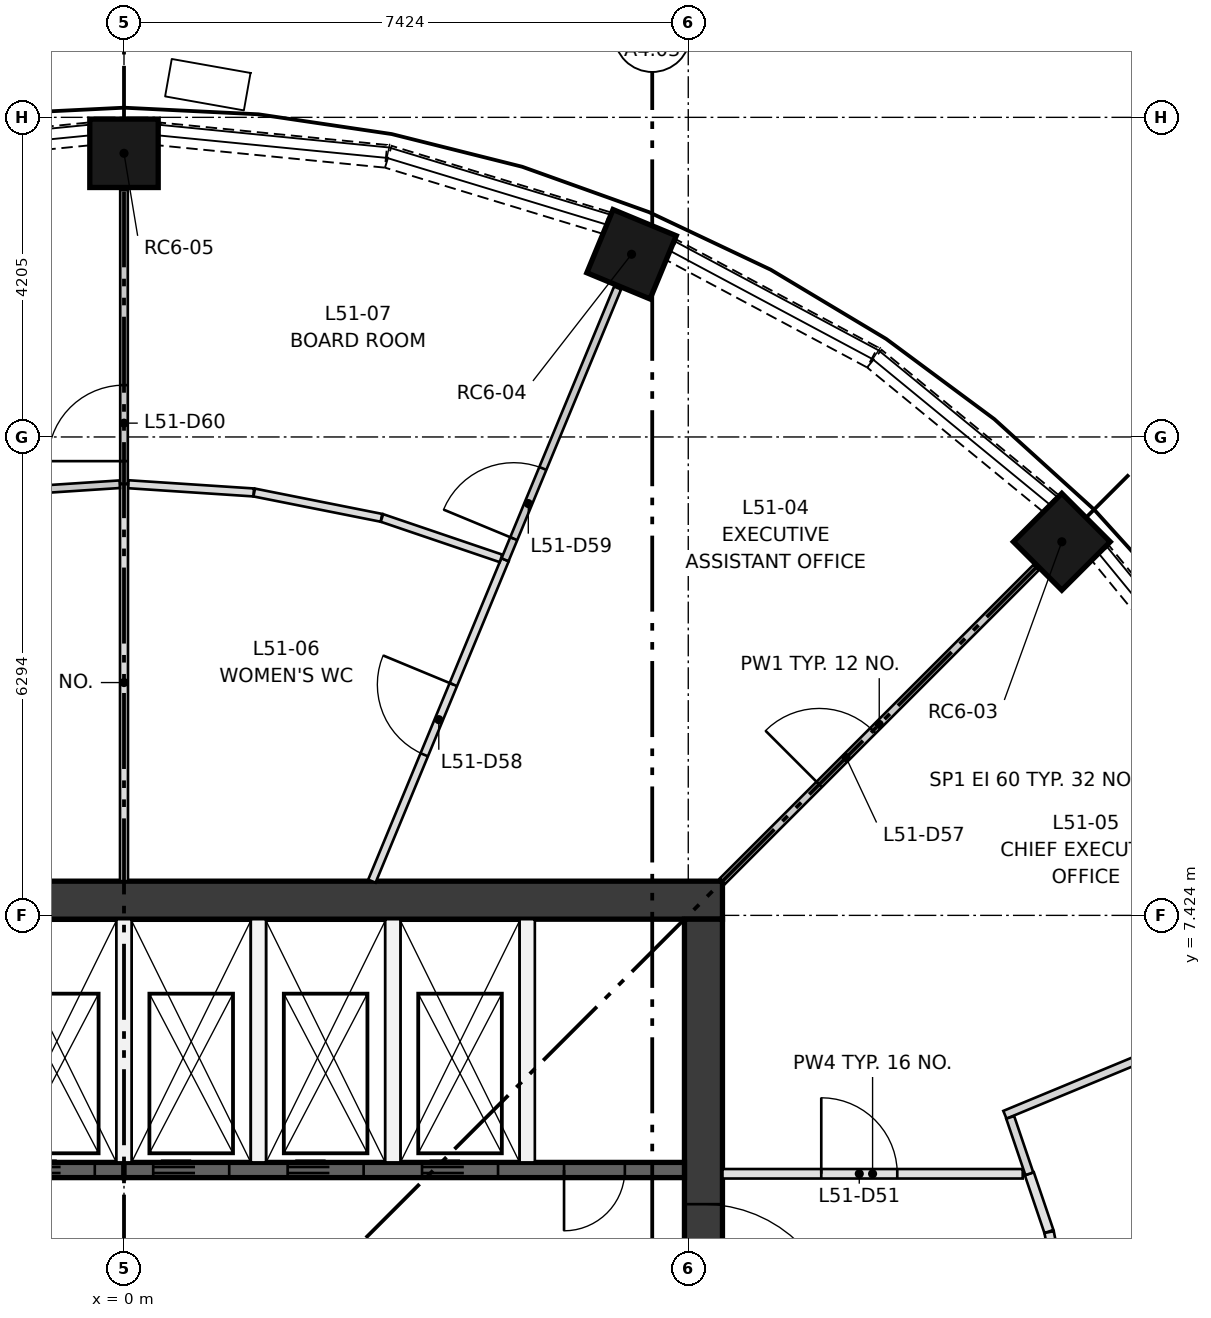
"""IFC4 building model, lengths in metres.
Left out: names, types, materials, properties, quantities, classifications, styles, units other than length and angle.
Written with IfcOpenShell. Run it as: python <this file> out.ifc"""

import sys

from ifc_helpers import new_model, si_unit, direction, frame, frame_2d, origin, origin_2d, place, context, subcontext, project, spatial, rectangle, extrude, element, fill, save


model = new_model("IFC4")
c1 = context("Model", 3, precision=1e-05, world=origin(), true_north=direction((0.0, 1.0)))
c2 = subcontext(c1, "Body", "Model", "MODEL_VIEW")
j1 = project(units=[si_unit("LENGTHUNIT", "METRE"), si_unit("PLANEANGLEUNIT", "RADIAN")], contexts=[c1])
p1 = place(None, origin())
s1 = spatial("IfcSite", under=j1, at=p1, CompositionType="ELEMENT")
p2 = place(p1, origin())
s2 = spatial("IfcBuilding", under=s1, at=p2, CompositionType="ELEMENT")
p3 = place(p2, frame((0.0, 0.0, 191.0)))
s3 = spatial("IfcBuildingStorey", under=s2, at=p3, CompositionType="ELEMENT", Elevation=191.0)
for number, where, z_axis, x_axis in (
    (1, (12.339, 12.339, 0.0), (0.0, 0.0, 1.0), (0.707, 0.707, 0.0)),
    (2, (6.678, 16.122, 0.0), (0.0, 0.0, 1.0), (0.383, 0.924, 0.0)),
    (3, (0.0, 17.45, 0.0), (0.0, 0.0, 1.0), (0.0, 1.0, 0.0)),
):
    element("IfcColumn", number, at=place(p3, frame(where, z_axis=z_axis, x_axis=x_axis)), inside=s3, PredefinedType="COLUMN", context=c2, shape_type="SweptSolid", body=[
        extrude(rectangle(XDim=0.9, YDim=0.9, at=origin_2d()), origin(), (0.0, 0.0, 1.0), 2.85),
    ])
p4 = place(p3, frame((-7.874, 7.624, 0.0), z_axis=(0.0, 0.0, 1.0), x_axis=(1.0, 0.0, 0.0)))
e4 = element("IfcWall", 4, at=p4, inside=s3, PredefinedType="SHEAR", context=c2, shape_type="SweptSolid", body=[
    extrude(rectangle(XDim=15.748, YDim=0.5, at=frame_2d((7.874, 0.0))), origin(), (0.0, 0.0, 1.0), 3.35),
])
p5 = place(p3, frame((7.624, -7.374, 0.0), z_axis=(0.0, 0.0, 1.0), x_axis=(0.0, 1.0, 0.0)))
e5 = element("IfcWall", 5, at=p5, inside=s3, PredefinedType="SHEAR", context=c2, shape_type="SweptSolid", body=[
    extrude(rectangle(XDim=14.748, YDim=0.5, at=frame_2d((7.374, 0.0))), origin(), (0.0, 0.0, 1.0), 3.35),
])
p6 = place(p5, frame((6.874, 0.0, 0.0)))
e6 = element("IfcOpeningElement", 6, at=p6, cuts=e5, PredefinedType="OPENING", context=c2, shape_type="SweptSolid", body=[
    extrude(rectangle(XDim=1.0, YDim=2.1, at=frame_2d((0.5, 1.05))), frame((0.0, 0.26, 0.0), z_axis=(0.0, -1.0, 0.0), x_axis=(1.0, 0.0, 0.0)), (0.0, 0.0, 1.0), 0.52),
])
p7 = place(p5, frame((3.75, 0.0, 0.0)))
e7 = element("IfcOpeningElement", 7, at=p7, cuts=e5, PredefinedType="OPENING", context=c2, shape_type="SweptSolid", body=[
    extrude(rectangle(XDim=1.8, YDim=2.1, at=frame_2d((0.9, 1.05))), frame((0.0, 0.26, 0.0), z_axis=(0.0, -1.0, 0.0), x_axis=(1.0, 0.0, 0.0)), (0.0, 0.0, 1.0), 0.52),
])
p8 = place(p5, frame((9.198, 0.0, 0.0)))
e8 = element("IfcOpeningElement", 8, at=p8, cuts=e5, PredefinedType="OPENING", context=c2, shape_type="SweptSolid", body=[
    extrude(rectangle(XDim=1.8, YDim=2.1, at=frame_2d((0.9, 1.05))), frame((0.0, 0.26, 0.0), z_axis=(0.0, -1.0, 0.0), x_axis=(1.0, 0.0, 0.0)), (0.0, 0.0, 1.0), 0.52),
])
p9 = place(p3, frame((-7.374, 4.074, 0.0), z_axis=(0.0, 0.0, 1.0), x_axis=(1.0, 0.0, 0.0)))
e9 = element("IfcWall", 9, at=p9, inside=s3, PredefinedType="SHEAR", context=c2, shape_type="SweptSolid", body=[
    extrude(rectangle(XDim=7.374, YDim=0.2, at=frame_2d((3.687, 0.0))), origin(), (0.0, 0.0, 1.0), 3.0),
])
p10 = place(p9, frame((0.684, 0.0, 0.0)))
e10 = element("IfcOpeningElement", 10, at=p10, cuts=e9, PredefinedType="OPENING", context=c2, shape_type="SweptSolid", body=[
    extrude(rectangle(XDim=1.0, YDim=2.1, at=frame_2d((0.5, 1.05))), frame((0.0, 0.11, 0.0), z_axis=(0.0, -1.0, 0.0), x_axis=(1.0, 0.0, 0.0)), (0.0, 0.0, 1.0), 0.22),
])
p11 = place(p9, frame((2.453, 0.0, 0.0)))
e11 = element("IfcOpeningElement", 11, at=p11, cuts=e9, PredefinedType="OPENING", context=c2, shape_type="SweptSolid", body=[
    extrude(rectangle(XDim=1.0, YDim=2.1, at=frame_2d((0.5, 1.05))), frame((0.0, 0.11, 0.0), z_axis=(0.0, -1.0, 0.0), x_axis=(1.0, 0.0, 0.0)), (0.0, 0.0, 1.0), 0.22),
])
p12 = place(p9, frame((4.221, 0.0, 0.0)))
e12 = element("IfcOpeningElement", 12, at=p12, cuts=e9, PredefinedType="OPENING", context=c2, shape_type="SweptSolid", body=[
    extrude(rectangle(XDim=1.0, YDim=2.1, at=frame_2d((0.5, 1.05))), frame((0.0, 0.11, 0.0), z_axis=(0.0, -1.0, 0.0), x_axis=(1.0, 0.0, 0.0)), (0.0, 0.0, 1.0), 0.22),
])
p13 = place(p9, frame((5.99, 0.0, 0.0)))
e13 = element("IfcOpeningElement", 13, at=p13, cuts=e9, PredefinedType="OPENING", context=c2, shape_type="SweptSolid", body=[
    extrude(rectangle(XDim=1.0, YDim=2.1, at=frame_2d((0.5, 1.05))), frame((0.0, 0.11, 0.0), z_axis=(0.0, -1.0, 0.0), x_axis=(1.0, 0.0, 0.0)), (0.0, 0.0, 1.0), 0.22),
])
p14 = place(p3, frame((0.0, 4.074, 0.0), z_axis=(0.0, 0.0, 1.0), x_axis=(1.0, 0.0, 0.0)))
e14 = element("IfcWall", 14, at=p14, inside=s3, PredefinedType="SHEAR", context=c2, shape_type="SweptSolid", body=[
    extrude(rectangle(XDim=7.374, YDim=0.2, at=frame_2d((3.687, 0.0))), origin(), (0.0, 0.0, 1.0), 3.0),
])
p15 = place(p14, frame((0.384, 0.0, 0.0)))
e15 = element("IfcOpeningElement", 15, at=p15, cuts=e14, PredefinedType="OPENING", context=c2, shape_type="SweptSolid", body=[
    extrude(rectangle(XDim=1.0, YDim=2.1, at=frame_2d((0.5, 1.05))), frame((0.0, 0.11, 0.0), z_axis=(0.0, -1.0, 0.0), x_axis=(1.0, 0.0, 0.0)), (0.0, 0.0, 1.0), 0.22),
])
p16 = place(p14, frame((2.153, 0.0, 0.0)))
e16 = element("IfcOpeningElement", 16, at=p16, cuts=e14, PredefinedType="OPENING", context=c2, shape_type="SweptSolid", body=[
    extrude(rectangle(XDim=1.0, YDim=2.1, at=frame_2d((0.5, 1.05))), frame((0.0, 0.11, 0.0), z_axis=(0.0, -1.0, 0.0), x_axis=(1.0, 0.0, 0.0)), (0.0, 0.0, 1.0), 0.22),
])
p17 = place(p14, frame((3.921, 0.0, 0.0)))
e17 = element("IfcOpeningElement", 17, at=p17, cuts=e14, PredefinedType="OPENING", context=c2, shape_type="SweptSolid", body=[
    extrude(rectangle(XDim=1.0, YDim=2.1, at=frame_2d((0.5, 1.05))), frame((0.0, 0.11, 0.0), z_axis=(0.0, -1.0, 0.0), x_axis=(1.0, 0.0, 0.0)), (0.0, 0.0, 1.0), 0.22),
])
p18 = place(p14, frame((5.79, 0.0, 0.0)))
e18 = element("IfcOpeningElement", 18, at=p18, cuts=e14, PredefinedType="OPENING", context=c2, shape_type="SweptSolid", body=[
    extrude(rectangle(XDim=0.8, YDim=2.1, at=frame_2d((0.4, 1.05))), frame((0.0, 0.11, 0.0), z_axis=(0.0, -1.0, 0.0), x_axis=(1.0, 0.0, 0.0)), (0.0, 0.0, 1.0), 0.22),
])
for number, where, z_axis, x_axis in (
    (19, (0.0, 4.174, 0.0), (0.0, 0.0, 1.0), (0.0, 1.0, 0.0)),
    (20, (1.769, 4.174, 0.0), (0.0, 0.0, 1.0), (0.0, 1.0, 0.0)),
    (21, (3.537, 4.174, 0.0), (0.0, 0.0, 1.0), (0.0, 1.0, 0.0)),
    (22, (5.305, 4.174, 0.0), (0.0, 0.0, 1.0), (0.0, 1.0, 0.0)),
):
    element("IfcWall", number, at=place(p3, frame(where, z_axis=z_axis, x_axis=x_axis)), inside=s3, PredefinedType="PARTITIONING", context=c2, shape_type="SweptSolid", body=[
        extrude(rectangle(XDim=3.2, YDim=0.2, at=frame_2d((1.6, 0.0))), origin(), (0.0, 0.0, 1.0), 3.0),
    ])
for number, where, z_axis, x_axis in (
    (23, (14.749, 9.873, 0.0), (0.0, 0.0, 1.0), (-0.634, 0.773, 0.0)),
    (24, (12.191, 12.846, 0.0), (0.0, 0.0, 1.0), (-0.773, 0.634, 0.0)),
):
    element("IfcWall", number, at=place(p3, frame(where, z_axis=z_axis, x_axis=x_axis)), inside=s3, PredefinedType="SOLIDWALL", context=c2, shape_type="SweptSolid", body=[
        extrude(rectangle(XDim=2.999, YDim=0.3, at=frame_2d((1.5, 0.0))), origin(), (0.0, 0.0, 1.0), 0.9),
    ])
p19 = place(p3, frame((9.848, 14.765, 0.0), z_axis=(0.0, 0.0, 1.0), x_axis=(-0.881827169278, 0.471572734074, 0.0)))
e25 = element("IfcWall", 25, at=p19, inside=s3, PredefinedType="SOLIDWALL", context=c2, shape_type="SweptSolid", body=[
    extrude(rectangle(XDim=2.998, YDim=0.3, at=frame_2d((1.499, 0.0))), origin(), (0.0, 0.0, 1.0), 0.9),
])
p20 = place(p3, frame((6.347, 16.533, 0.0), z_axis=(0.0, 0.0, 1.0), x_axis=(-0.95687774785, 0.290490921835, 0.0)))
e26 = element("IfcWall", 26, at=p20, inside=s3, PredefinedType="SOLIDWALL", context=c2, shape_type="SweptSolid", body=[
    extrude(rectangle(XDim=2.999, YDim=0.3, at=frame_2d((1.5, 0.0))), origin(), (0.0, 0.0, 1.0), 0.9),
])
for number, where, z_axis, x_axis in (
    (27, (3.448, 17.41, 0.0), (0.0, 0.0, 1.0), (-0.995, 0.098, 0.0)),
    (28, (-0.464, 17.705, 0.0), (0.0, 0.0, 1.0), (-0.995, -0.098, 0.0)),
):
    element("IfcWall", number, at=place(p3, frame(where, z_axis=z_axis, x_axis=x_axis)), inside=s3, PredefinedType="SOLIDWALL", context=c2, shape_type="SweptSolid", body=[
        extrude(rectangle(XDim=2.999, YDim=0.3, at=frame_2d((1.499, 0.0))), origin(), (0.0, 0.0, 1.0), 0.9),
    ])
p21 = place(p3, frame((11.912, 4.024, 0.0), z_axis=(0.0, 0.0, 1.0), x_axis=(0.321427947704, -0.946934039115, 0.0)))
e29 = element("IfcWall", 29, at=p21, inside=s3, PredefinedType="PARTITIONING", context=c2, shape_type="SweptSolid", body=[
    extrude(rectangle(XDim=0.802, YDim=0.125, at=frame_2d((0.401, 0.0))), origin(), (0.0, 0.0, 1.0), 3.0),
])
p22 = place(p3, frame((12.171, 3.257, 0.0), z_axis=(0.0, 0.0, 1.0), x_axis=(0.195171279076, -0.980769173569, 0.0)))
e30 = element("IfcWall", 30, at=p22, inside=s3, PredefinedType="PARTITIONING", context=c2, shape_type="SweptSolid", body=[
    extrude(rectangle(XDim=1.64, YDim=0.125, at=frame_2d((0.82, 0.0))), origin(), (0.0, 0.0, 1.0), 3.0),
])
p23 = place(p22, frame((0.3, 0.0, 0.0)))
e31 = element("IfcOpeningElement", 31, at=p23, cuts=e30, PredefinedType="OPENING", context=c2, shape_type="SweptSolid", body=[
    extrude(rectangle(XDim=1.0, YDim=2.1, at=frame_2d((0.5, 1.05))), frame((0.0, 0.073, 0.0), z_axis=(0.0, -1.0, 0.0), x_axis=(1.0, 0.0, 0.0)), (0.0, 0.0, 1.0), 0.145),
])
p24 = place(p3, frame((7.874, 4.024, 0.0), z_axis=(0.0, 0.0, 1.0), x_axis=(1.0, 0.0, 0.0)))
e32 = element("IfcWall", 32, at=p24, inside=s3, PredefinedType="PARTITIONING", context=c2, shape_type="SweptSolid", body=[
    extrude(rectangle(XDim=3.95, YDim=0.125, at=frame_2d((1.975, 0.0))), origin(), (0.0, 0.0, 1.0), 3.0),
])
p25 = place(p24, frame((1.3, 0.0, 0.0)))
e33 = element("IfcOpeningElement", 33, at=p25, cuts=e32, PredefinedType="OPENING", context=c2, shape_type="SweptSolid", body=[
    extrude(rectangle(XDim=1.0, YDim=2.1, at=frame_2d((0.5, 1.05))), frame((0.0, 0.073, 0.0), z_axis=(0.0, -1.0, 0.0), x_axis=(1.0, 0.0, 0.0)), (0.0, 0.0, 1.0), 0.145),
])
p26 = place(p3, frame((11.59, 4.801, 0.0), z_axis=(0.0, 0.0, 1.0), x_axis=(0.92387965154, 0.382683145003, 0.0)))
e34 = element("IfcWall", 34, at=p26, inside=s3, PredefinedType="PARTITIONING", context=c2, shape_type="SweptSolid", body=[
    extrude(rectangle(XDim=4.425, YDim=0.11, at=frame_2d((2.212, 0.0))), origin(), (0.0, 0.0, 1.0), 3.0),
])
p27 = place(p3, frame((11.912, 4.024, 0.0), z_axis=(0.0, 0.0, 1.0), x_axis=(-0.321366225339, 0.946954987954, 0.0)))
e35 = element("IfcWall", 35, at=p27, inside=s3, PredefinedType="PARTITIONING", context=c2, shape_type="SweptSolid", body=[
    extrude(rectangle(XDim=0.783, YDim=0.11, at=frame_2d((0.392, 0.0))), origin(), (0.0, 0.0, 1.0), 3.0),
])
p28 = place(p3, frame((7.874, 7.874, 0.0), z_axis=(0.0, 0.0, 1.0), x_axis=(0.707106781187, 0.707106781187, 0.0)))
e36 = element("IfcWall", 36, at=p28, inside=s3, PredefinedType="PARTITIONING", context=c2, shape_type="SweptSolid", body=[
    extrude(rectangle(XDim=5.834, YDim=0.1, at=frame_2d((2.917, 0.0))), origin(), (0.0, 0.0, 1.0), 3.0),
])
p29 = place(p28, frame((1.8, 0.0, 0.0)))
e37 = element("IfcOpeningElement", 37, at=p29, cuts=e36, PredefinedType="OPENING", context=c2, shape_type="SweptSolid", body=[
    extrude(rectangle(XDim=1.0, YDim=2.1, at=frame_2d((0.5, 1.05))), frame((0.0, 0.06, 0.0), z_axis=(0.0, -1.0, 0.0), x_axis=(1.0, 0.0, 0.0)), (0.0, 0.0, 1.0), 0.12),
])
p30 = place(p3, frame((3.261, 7.874, 0.0), z_axis=(0.0, 0.0, 1.0), x_axis=(0.382701956612, 0.923871859299, 0.0)))
e38 = element("IfcWall", 38, at=p30, inside=s3, PredefinedType="PARTITIONING", context=c2, shape_type="SweptSolid", body=[
    extrude(rectangle(XDim=4.577, YDim=0.105, at=frame_2d((2.289, 0.0))), origin(), (0.0, 0.0, 1.0), 3.0),
])
p31 = place(p30, frame((1.8, 0.0, 0.0)))
e39 = element("IfcOpeningElement", 39, at=p31, cuts=e38, PredefinedType="OPENING", context=c2, shape_type="SweptSolid", body=[
    extrude(rectangle(XDim=1.0, YDim=2.1, at=frame_2d((0.5, 1.05))), frame((0.0, 0.062, 0.0), z_axis=(0.0, -1.0, 0.0), x_axis=(1.0, 0.0, 0.0)), (0.0, 0.0, 1.0), 0.125),
])
p32 = place(p3, frame((5.013, 12.103, 0.0), z_axis=(0.0, 0.0, 1.0), x_axis=(0.382674944996, 0.923883048049, 0.0)))
e40 = element("IfcWall", 40, at=p32, inside=s3, PredefinedType="PARTITIONING", context=c2, shape_type="SweptSolid", body=[
    extrude(rectangle(XDim=3.87, YDim=0.1, at=frame_2d((1.935, 0.0))), origin(), (0.0, 0.0, 1.0), 3.0),
])
p33 = place(p32, frame((0.3, 0.0, 0.0)))
e41 = element("IfcOpeningElement", 41, at=p33, cuts=e40, PredefinedType="OPENING", context=c2, shape_type="SweptSolid", body=[
    extrude(rectangle(XDim=1.0, YDim=2.1, at=frame_2d((0.5, 1.05))), frame((0.0, 0.06, 0.0), z_axis=(0.0, -1.0, 0.0), x_axis=(1.0, 0.0, 0.0)), (0.0, 0.0, 1.0), 0.12),
])
p34 = place(p3, frame((0.056, 13.096, 0.0), z_axis=(0.0, 0.0, 1.0), x_axis=(0.997860265299, -0.06538265013, 0.0)))
e42 = element("IfcWall", 42, at=p34, inside=s3, PredefinedType="PARTITIONING", context=c2, shape_type="SweptSolid", body=[
    extrude(rectangle(XDim=1.654, YDim=0.105, at=frame_2d((0.827, 0.0))), origin(), (0.0, 0.0, 1.0), 3.0),
])
p35 = place(p3, frame((1.713, 12.987, 0.0), z_axis=(0.0, 0.0, 1.0), x_axis=(0.980778250333, -0.195125661239, 0.0)))
e43 = element("IfcWall", 43, at=p35, inside=s3, PredefinedType="PARTITIONING", context=c2, shape_type="SweptSolid", body=[
    extrude(rectangle(XDim=1.707, YDim=0.105, at=frame_2d((0.853, 0.0))), origin(), (0.0, 0.0, 1.0), 3.0),
])
p36 = place(p3, frame((3.394, 12.653, 0.0), z_axis=(0.0, 0.0, 1.0), x_axis=(0.946927367808, -0.321447600855, 0.0)))
e44 = element("IfcWall", 44, at=p36, inside=s3, PredefinedType="PARTITIONING", context=c2, shape_type="SweptSolid", body=[
    extrude(rectangle(XDim=1.654, YDim=0.105, at=frame_2d((0.827, 0.0))), origin(), (0.0, 0.0, 1.0), 3.0),
])
p37 = place(p3, frame((0.0, 7.874, 0.0), z_axis=(0.0, 0.0, 1.0), x_axis=(0.0, 1.0, 0.0)))
e45 = element("IfcWall", 45, at=p37, inside=s3, PredefinedType="PARTITIONING", context=c2, shape_type="SweptSolid", body=[
    extrude(rectangle(XDim=5.226, YDim=0.105, at=frame_2d((2.613, 0.0))), origin(), (0.0, 0.0, 1.0), 3.0),
])
p38 = place(p3, frame((0.0, 13.1, 0.0), z_axis=(0.0, 0.0, 1.0), x_axis=(0.0, 1.0, 0.0)))
e46 = element("IfcWall", 46, at=p38, inside=s3, PredefinedType="PARTITIONING", context=c2, shape_type="SweptSolid", body=[
    extrude(rectangle(XDim=3.87, YDim=0.1, at=frame_2d((1.935, 0.0))), origin(), (0.0, 0.0, 1.0), 3.0),
])
p39 = place(p38, frame((0.3, 0.0, 0.0)))
e47 = element("IfcOpeningElement", 47, at=p39, cuts=e46, PredefinedType="OPENING", context=c2, shape_type="SweptSolid", body=[
    extrude(rectangle(XDim=1.0, YDim=2.1, at=frame_2d((0.5, 1.05))), frame((0.0, 0.06, 0.0), z_axis=(0.0, -1.0, 0.0), x_axis=(1.0, 0.0, 0.0)), (0.0, 0.0, 1.0), 0.12),
])
p40 = place(p3, frame((-1.707, 12.988, 0.0), z_axis=(0.0, 0.0, 1.0), x_axis=(0.997860265299, 0.06538265013, 0.0)))
e48 = element("IfcWall", 48, at=p40, inside=s3, PredefinedType="PARTITIONING", context=c2, shape_type="SweptSolid", body=[
    extrude(rectangle(XDim=1.654, YDim=0.1, at=frame_2d((0.827, 0.0))), origin(), (0.0, 0.0, 1.0), 3.0),
])
p41 = place(p13, frame((1.0, 0.0, 0.0), z_axis=(0.0, 0.0, 1.0), x_axis=(-1.0, 0.0, 0.0)))
e49 = element("IfcDoor", 49, at=p41, inside=s3, OperationType="DOUBLE_DOOR_SLIDING", PredefinedType="DOOR", context=c2, shape_type="SweptSolid", body=[
    extrude(rectangle(XDim=1.0, YDim=2.1, at=frame_2d((0.5, 1.05))), frame((0.0, 0.025, 0.0), z_axis=(0.0, -1.0, 0.0), x_axis=(1.0, 0.0, 0.0)), (0.0, 0.0, 1.0), 0.05),
])
fill(e13, e49)
p42 = place(p15, frame((1.0, 0.0, 0.0), z_axis=(0.0, 0.0, 1.0), x_axis=(-1.0, 0.0, 0.0)))
e50 = element("IfcDoor", 50, at=p42, inside=s3, OperationType="DOUBLE_DOOR_SLIDING", PredefinedType="DOOR", context=c2, shape_type="SweptSolid", body=[
    extrude(rectangle(XDim=1.0, YDim=2.1, at=frame_2d((0.5, 1.05))), frame((0.0, 0.025, 0.0), z_axis=(0.0, -1.0, 0.0), x_axis=(1.0, 0.0, 0.0)), (0.0, 0.0, 1.0), 0.05),
])
fill(e15, e50)
p43 = place(p16, frame((1.0, 0.0, 0.0), z_axis=(0.0, 0.0, 1.0), x_axis=(-1.0, 0.0, 0.0)))
e51 = element("IfcDoor", 51, at=p43, inside=s3, OperationType="DOUBLE_DOOR_SLIDING", PredefinedType="DOOR", context=c2, shape_type="SweptSolid", body=[
    extrude(rectangle(XDim=1.0, YDim=2.1, at=frame_2d((0.5, 1.05))), frame((0.0, 0.025, 0.0), z_axis=(0.0, -1.0, 0.0), x_axis=(1.0, 0.0, 0.0)), (0.0, 0.0, 1.0), 0.05),
])
fill(e16, e51)
p44 = place(p17, frame((1.0, 0.0, 0.0), z_axis=(0.0, 0.0, 1.0), x_axis=(-1.0, 0.0, 0.0)))
e52 = element("IfcDoor", 52, at=p44, inside=s3, OperationType="DOUBLE_DOOR_SLIDING", PredefinedType="DOOR", context=c2, shape_type="SweptSolid", body=[
    extrude(rectangle(XDim=1.0, YDim=2.1, at=frame_2d((0.5, 1.05))), frame((0.0, 0.025, 0.0), z_axis=(0.0, -1.0, 0.0), x_axis=(1.0, 0.0, 0.0)), (0.0, 0.0, 1.0), 0.05),
])
fill(e17, e52)
p45 = place(p18, frame((0.8, 0.0, 0.0), z_axis=(0.0, 0.0, 1.0), x_axis=(-1.0, 0.0, 0.0)))
e53 = element("IfcDoor", 53, at=p45, inside=s3, OperationType="SINGLE_SWING_LEFT", PredefinedType="DOOR", context=c2, shape_type="SweptSolid", body=[
    extrude(rectangle(XDim=0.8, YDim=2.1, at=frame_2d((0.4, 1.05))), frame((0.0, 0.025, 0.0), z_axis=(0.0, -1.0, 0.0), x_axis=(1.0, 0.0, 0.0)), (0.0, 0.0, 1.0), 0.05),
])
fill(e18, e53)
p46 = place(p8, frame((1.8, 0.0, 0.0), z_axis=(0.0, 0.0, 1.0), x_axis=(-1.0, 0.0, 0.0)))
e54 = element("IfcDoor", 54, at=p46, inside=s3, OperationType="DOUBLE_DOOR_SINGLE_SWING", PredefinedType="DOOR", context=c2, shape_type="SweptSolid", body=[
    extrude(rectangle(XDim=1.8, YDim=2.1, at=frame_2d((0.9, 1.05))), frame((0.0, 0.025, 0.0), z_axis=(0.0, -1.0, 0.0), x_axis=(1.0, 0.0, 0.0)), (0.0, 0.0, 1.0), 0.05),
])
fill(e8, e54)
p47 = place(p25, origin())
e55 = element("IfcDoor", 55, at=p47, inside=s3, OperationType="SINGLE_SWING_LEFT", PredefinedType="DOOR", context=c2, shape_type="SweptSolid", body=[
    extrude(rectangle(XDim=1.0, YDim=2.1, at=frame_2d((0.5, 1.05))), frame((0.0, 0.025, 0.0), z_axis=(0.0, -1.0, 0.0), x_axis=(1.0, 0.0, 0.0)), (0.0, 0.0, 1.0), 0.05),
])
fill(e33, e55)
p48 = place(p29, origin())
e56 = element("IfcDoor", 56, at=p48, inside=s3, OperationType="SINGLE_SWING_LEFT", PredefinedType="DOOR", context=c2, shape_type="SweptSolid", body=[
    extrude(rectangle(XDim=1.0, YDim=2.1, at=frame_2d((0.5, 1.05))), frame((0.0, 0.025, 0.0), z_axis=(0.0, -1.0, 0.0), x_axis=(1.0, 0.0, 0.0)), (0.0, 0.0, 1.0), 0.05),
])
fill(e37, e56)
p49 = place(p31, origin())
e57 = element("IfcDoor", 57, at=p49, inside=s3, OperationType="SINGLE_SWING_RIGHT", PredefinedType="DOOR", context=c2, shape_type="SweptSolid", body=[
    extrude(rectangle(XDim=1.0, YDim=2.1, at=frame_2d((0.5, 1.05))), frame((0.0, 0.025, 0.0), z_axis=(0.0, -1.0, 0.0), x_axis=(1.0, 0.0, 0.0)), (0.0, 0.0, 1.0), 0.05),
])
fill(e39, e57)
p50 = place(p33, origin())
e58 = element("IfcDoor", 58, at=p50, inside=s3, OperationType="SINGLE_SWING_LEFT", PredefinedType="DOOR", context=c2, shape_type="SweptSolid", body=[
    extrude(rectangle(XDim=1.0, YDim=2.1, at=frame_2d((0.5, 1.05))), frame((0.0, 0.025, 0.0), z_axis=(0.0, -1.0, 0.0), x_axis=(1.0, 0.0, 0.0)), (0.0, 0.0, 1.0), 0.05),
])
fill(e41, e58)
p51 = place(p39, origin())
e59 = element("IfcDoor", 59, at=p51, inside=s3, OperationType="SINGLE_SWING_LEFT", PredefinedType="DOOR", context=c2, shape_type="SweptSolid", body=[
    extrude(rectangle(XDim=1.0, YDim=2.1, at=frame_2d((0.5, 1.05))), frame((0.0, 0.025, 0.0), z_axis=(0.0, -1.0, 0.0), x_axis=(1.0, 0.0, 0.0)), (0.0, 0.0, 1.0), 0.05),
])
fill(e47, e59)
save(model, sys.argv[1])
